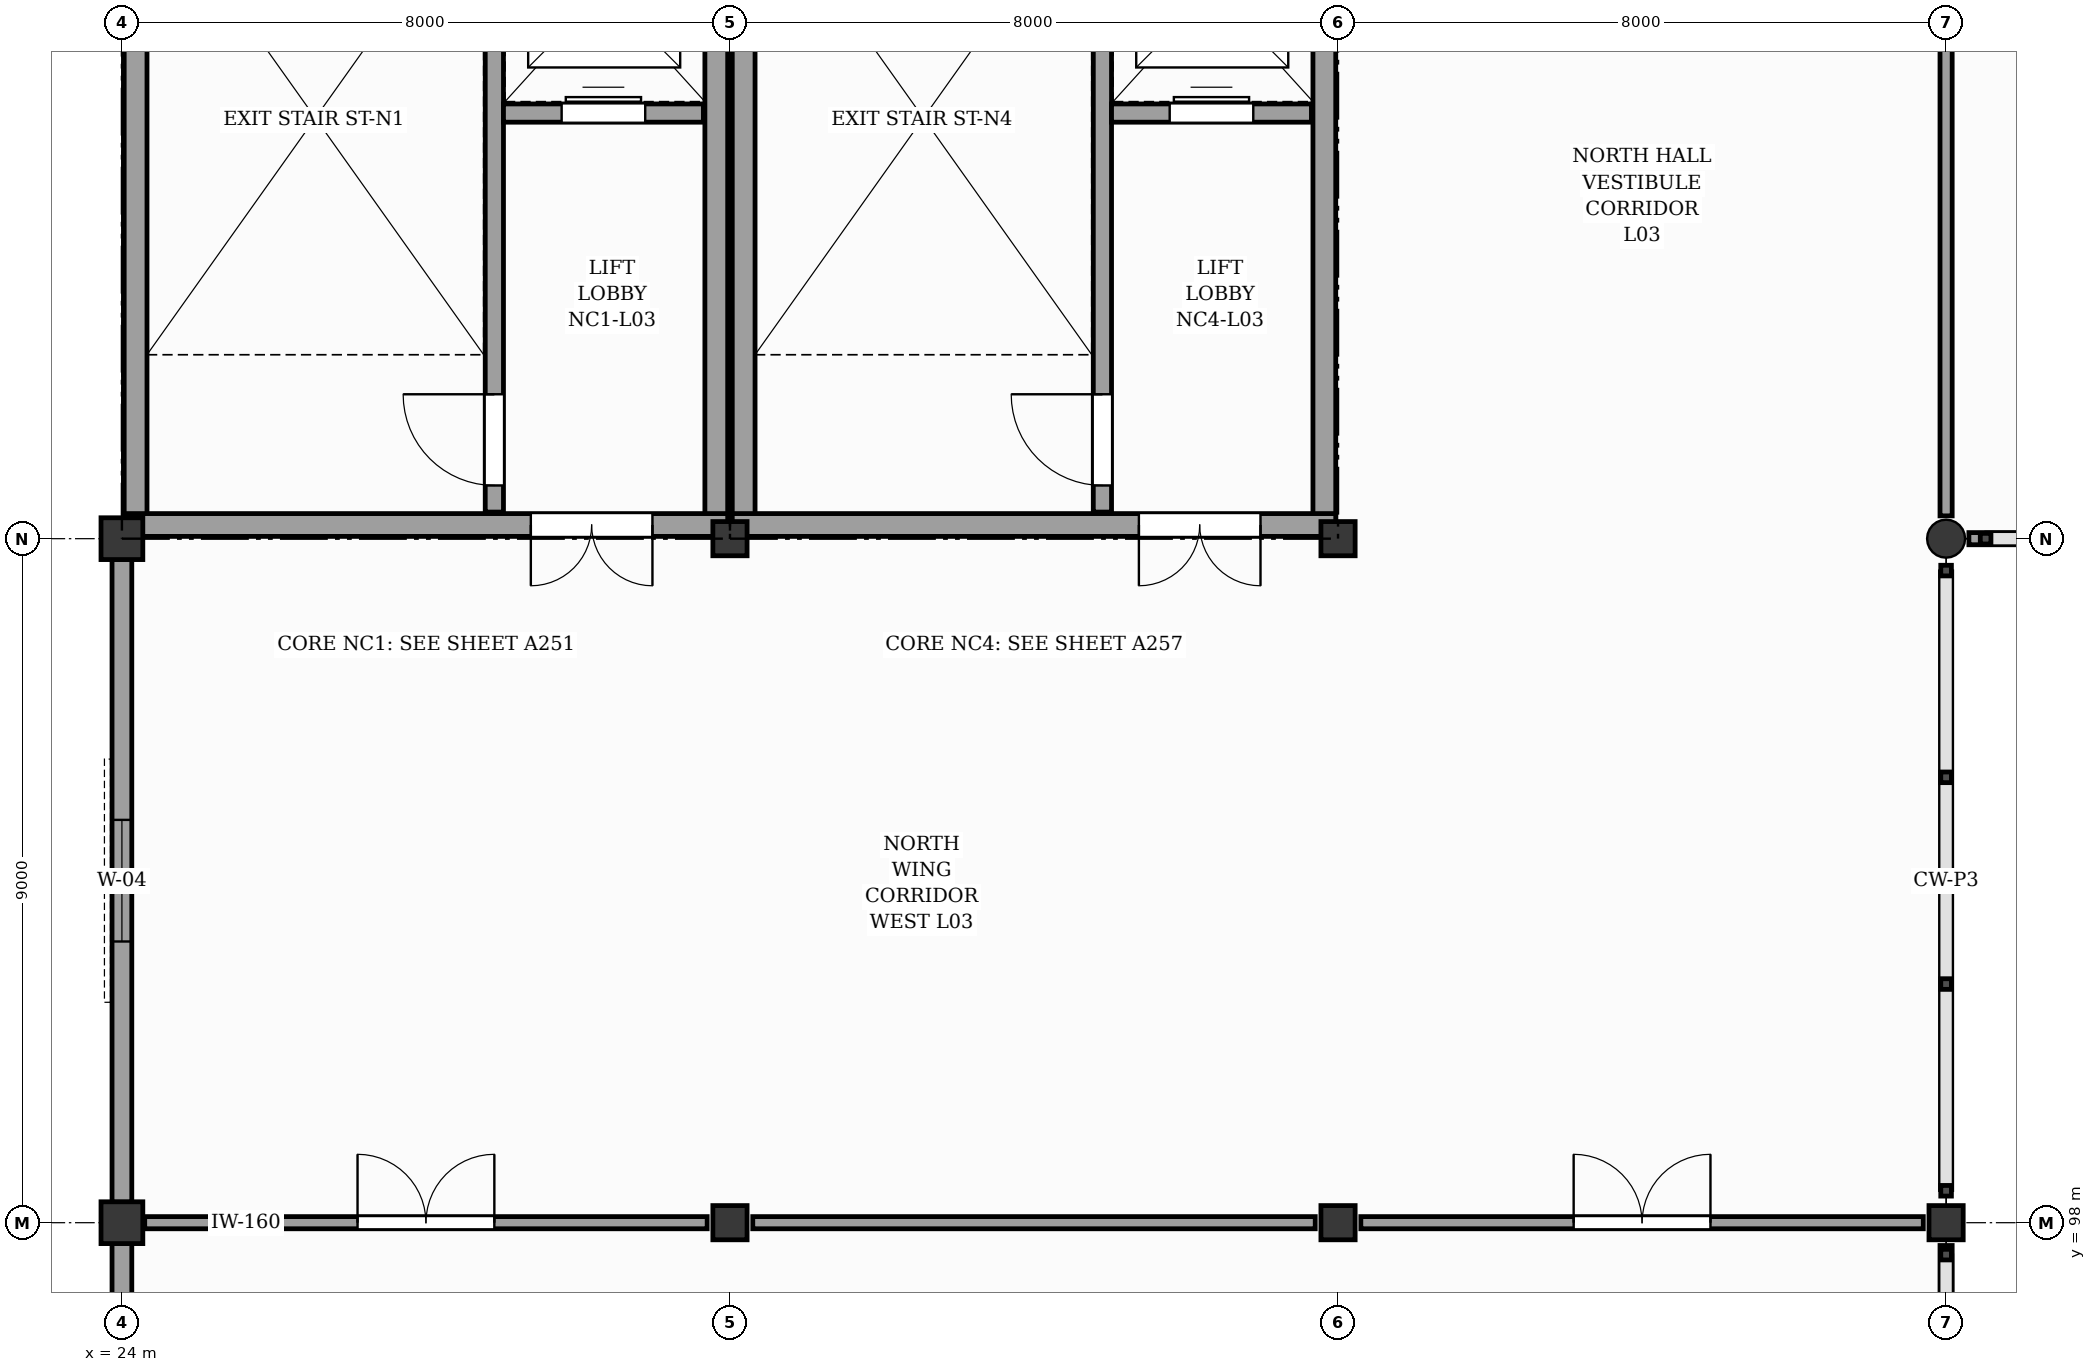
"""IFC4 building model, lengths in metres.
Left out: names, types, materials, properties, quantities, classifications, styles, units other than length and angle.
Written with IfcOpenShell. Run it as: python <this file> out.ifc"""

import sys

from ifc_helpers import new_model, si_unit, direction, frame, frame_2d, origin, origin_2d, place, context, subcontext, project, spatial, rectangle, circle, extrude, element, fill, save


model = new_model("IFC4")
c1 = context("Model", 3, precision=1e-05, world=origin(), true_north=direction((0.0, 1.0)))
c2 = subcontext(c1, "Body", "Model", "MODEL_VIEW")
j1 = project(units=[si_unit("LENGTHUNIT", "METRE"), si_unit("PLANEANGLEUNIT", "RADIAN")], contexts=[c1])
p1 = place(None, origin())
s1 = spatial("IfcSite", under=j1, at=p1, CompositionType="ELEMENT")
p2 = place(p1, origin())
s2 = spatial("IfcBuilding", under=s1, at=p2, CompositionType="ELEMENT")
p3 = place(p2, frame((0.0, 0.0, 16.2)))
s3 = spatial("IfcBuildingStorey", under=s2, at=p3, CompositionType="ELEMENT", Elevation=16.2)
for number, where, z_axis, x_axis in (
    (1, (24.0, 98.0, 0.0), (0.0, 0.0, 1.0), (1.0, 0.0, 0.0)),
    (2, (24.0, 107.0, 0.0), (0.0, 0.0, 1.0), (1.0, 0.0, 0.0)),
):
    element("IfcColumn", number, at=place(p3, frame(where, z_axis=z_axis, x_axis=x_axis)), inside=s3, PredefinedType="COLUMN", context=c2, shape_type="SweptSolid", body=[
        extrude(rectangle(XDim=0.55, YDim=0.55, at=origin_2d()), origin(), (0.0, 0.0, 1.0), 4.2),
    ])
for number, where, z_axis, x_axis in (
    (3, (32.0, 98.0, 0.0), (0.0, 0.0, 1.0), (1.0, 0.0, 0.0)),
    (4, (32.0, 107.0, 0.0), (0.0, 0.0, 1.0), (1.0, 0.0, 0.0)),
    (5, (40.0, 98.0, 0.0), (0.0, 0.0, 1.0), (1.0, 0.0, 0.0)),
    (6, (40.0, 107.0, 0.0), (0.0, 0.0, 1.0), (1.0, 0.0, 0.0)),
    (7, (48.0, 98.0, 0.0), (0.0, 0.0, 1.0), (1.0, 0.0, 0.0)),
):
    element("IfcColumn", number, at=place(p3, frame(where, z_axis=z_axis, x_axis=x_axis)), inside=s3, PredefinedType="COLUMN", context=c2, shape_type="SweptSolid", body=[
        extrude(rectangle(XDim=0.45, YDim=0.45, at=origin_2d()), origin(), (0.0, 0.0, 1.0), 4.2),
    ])
p4 = place(p3, frame((48.0, 107.0, 0.0), z_axis=(0.0, 0.0, 1.0), x_axis=(1.0, 0.0, 0.0)))
e8 = element("IfcColumn", 8, at=p4, inside=s3, PredefinedType="COLUMN", context=c2, shape_type="SweptSolid", body=[
    extrude(circle(Radius=0.25, at=origin_2d()), origin(), (0.0, 0.0, 1.0), 4.2),
])
p5 = place(p3, frame((24.0, 89.27, 0.0), z_axis=(0.0, 0.0, 1.0), x_axis=(0.0, 1.0, 0.0)))
e9 = element("IfcWall", 9, at=p5, inside=s3, PredefinedType="SOLIDWALL", context=c2, shape_type="SweptSolid", body=[
    extrude(rectangle(XDim=8.46, YDim=0.26, at=frame_2d((4.23, 0.0))), origin(), (0.0, 0.0, 1.0), 3.24),
])
p6 = place(p5, frame((3.43, 0.0, 0.95)))
e10 = element("IfcOpeningElement", 10, at=p6, cuts=e9, PredefinedType="OPENING", context=c2, shape_type="SweptSolid", body=[
    extrude(rectangle(XDim=1.6, YDim=2.1, at=frame_2d((0.8, 1.05))), frame((0.0, 0.14, 0.0), z_axis=(0.0, -1.0, 0.0), x_axis=(1.0, 0.0, 0.0)), (0.0, 0.0, 1.0), 0.28),
])
p7 = place(p3, frame((24.0, 98.27, 0.0), z_axis=(0.0, 0.0, 1.0), x_axis=(0.0, 1.0, 0.0)))
e11 = element("IfcWall", 11, at=p7, inside=s3, PredefinedType="SOLIDWALL", context=c2, shape_type="SweptSolid", body=[
    extrude(rectangle(XDim=8.46, YDim=0.26, at=frame_2d((4.23, 0.0))), origin(), (0.0, 0.0, 1.0), 3.24),
])
p8 = place(p7, frame((3.43, 0.0, 0.95)))
e12 = element("IfcOpeningElement", 12, at=p8, cuts=e11, PredefinedType="OPENING", context=c2, shape_type="SweptSolid", body=[
    extrude(rectangle(XDim=1.6, YDim=2.1, at=frame_2d((0.8, 1.05))), frame((0.0, 0.14, 0.0), z_axis=(0.0, -1.0, 0.0), x_axis=(1.0, 0.0, 0.0)), (0.0, 0.0, 1.0), 0.28),
])
p9 = place(p3, frame((28.9, 107.35, 0.0), z_axis=(0.0, 0.0, 1.0), x_axis=(0.0, 1.0, 0.0)))
e13 = element("IfcWall", 13, at=p9, inside=s3, PredefinedType="SHEAR", context=c2, shape_type="SweptSolid", body=[
    extrude(rectangle(XDim=8.3, YDim=0.24, at=frame_2d((4.15, 0.0))), origin(), (0.0, 0.0, 1.0), 3.98),
])
p10 = place(p9, frame((0.35, 0.0, 0.0)))
e14 = element("IfcOpeningElement", 14, at=p10, cuts=e13, PredefinedType="OPENING", context=c2, shape_type="SweptSolid", body=[
    extrude(rectangle(XDim=1.2, YDim=2.15, at=frame_2d((0.6, 1.075))), frame((0.0, 0.13, 0.0), z_axis=(0.0, -1.0, 0.0), x_axis=(1.0, 0.0, 0.0)), (0.0, 0.0, 1.0), 0.26),
])
p11 = place(p3, frame((29.02, 112.6, 0.0), z_axis=(0.0, 0.0, 1.0), x_axis=(1.0, 0.0, 0.0)))
e15 = element("IfcWall", 15, at=p11, inside=s3, PredefinedType="SHEAR", context=c2, shape_type="SweptSolid", body=[
    extrude(rectangle(XDim=2.63, YDim=0.24, at=frame_2d((1.315, 0.0))), origin(), (0.0, 0.0, 1.0), 3.98),
])
p12 = place(p11, frame((0.765, 0.0, 0.0)))
e16 = element("IfcOpeningElement", 16, at=p12, cuts=e15, PredefinedType="OPENING", context=c2, shape_type="SweptSolid", body=[
    extrude(rectangle(XDim=1.1, YDim=2.15, at=frame_2d((0.55, 1.075))), frame((0.0, 0.13, 0.0), z_axis=(0.0, -1.0, 0.0), x_axis=(1.0, 0.0, 0.0)), (0.0, 0.0, 1.0), 0.26),
])
for number, where, z_axis, x_axis in (
    (17, (24.18, 107.18, 0.0), (0.0, 0.0, 1.0), (0.0, 1.0, 0.0)),
    (18, (31.82, 107.18, 0.0), (0.0, 0.0, 1.0), (0.0, 1.0, 0.0)),
):
    element("IfcWall", number, at=place(p3, frame(where, z_axis=z_axis, x_axis=x_axis)), inside=s3, PredefinedType="SHEAR", context=c2, shape_type="SweptSolid", body=[
        extrude(rectangle(XDim=8.64, YDim=0.3, at=frame_2d((4.32, 0.0))), origin(), (0.0, 0.0, 1.0), 3.98),
    ])
p13 = place(p3, frame((24.03, 107.18, 0.0), z_axis=(0.0, 0.0, 1.0), x_axis=(1.0, 0.0, 0.0)))
e19 = element("IfcWall", 19, at=p13, inside=s3, PredefinedType="SHEAR", context=c2, shape_type="SweptSolid", body=[
    extrude(rectangle(XDim=7.94, YDim=0.3, at=frame_2d((3.97, 0.0))), origin(), (0.0, 0.0, 1.0), 3.98),
])
p14 = place(p13, frame((5.35, 0.0, 0.0)))
e20 = element("IfcOpeningElement", 20, at=p14, cuts=e19, PredefinedType="OPENING", context=c2, shape_type="SweptSolid", body=[
    extrude(rectangle(XDim=1.6, YDim=2.15, at=frame_2d((0.8, 1.075))), frame((0.0, 0.16, 0.0), z_axis=(0.0, -1.0, 0.0), x_axis=(1.0, 0.0, 0.0)), (0.0, 0.0, 1.0), 0.32),
])
p15 = place(p3, frame((36.9, 107.35, 0.0), z_axis=(0.0, 0.0, 1.0), x_axis=(0.0, 1.0, 0.0)))
e21 = element("IfcWall", 21, at=p15, inside=s3, PredefinedType="SHEAR", context=c2, shape_type="SweptSolid", body=[
    extrude(rectangle(XDim=8.3, YDim=0.24, at=frame_2d((4.15, 0.0))), origin(), (0.0, 0.0, 1.0), 3.98),
])
p16 = place(p15, frame((0.35, 0.0, 0.0)))
e22 = element("IfcOpeningElement", 22, at=p16, cuts=e21, PredefinedType="OPENING", context=c2, shape_type="SweptSolid", body=[
    extrude(rectangle(XDim=1.2, YDim=2.15, at=frame_2d((0.6, 1.075))), frame((0.0, 0.13, 0.0), z_axis=(0.0, -1.0, 0.0), x_axis=(1.0, 0.0, 0.0)), (0.0, 0.0, 1.0), 0.26),
])
p17 = place(p3, frame((37.02, 112.6, 0.0), z_axis=(0.0, 0.0, 1.0), x_axis=(1.0, 0.0, 0.0)))
e23 = element("IfcWall", 23, at=p17, inside=s3, PredefinedType="SHEAR", context=c2, shape_type="SweptSolid", body=[
    extrude(rectangle(XDim=2.63, YDim=0.24, at=frame_2d((1.315, 0.0))), origin(), (0.0, 0.0, 1.0), 3.98),
])
p18 = place(p17, frame((0.765, 0.0, 0.0)))
e24 = element("IfcOpeningElement", 24, at=p18, cuts=e23, PredefinedType="OPENING", context=c2, shape_type="SweptSolid", body=[
    extrude(rectangle(XDim=1.1, YDim=2.15, at=frame_2d((0.55, 1.075))), frame((0.0, 0.13, 0.0), z_axis=(0.0, -1.0, 0.0), x_axis=(1.0, 0.0, 0.0)), (0.0, 0.0, 1.0), 0.26),
])
for number, where, z_axis, x_axis in (
    (25, (32.18, 107.18, 0.0), (0.0, 0.0, 1.0), (0.0, 1.0, 0.0)),
    (26, (39.82, 107.18, 0.0), (0.0, 0.0, 1.0), (0.0, 1.0, 0.0)),
):
    element("IfcWall", number, at=place(p3, frame(where, z_axis=z_axis, x_axis=x_axis)), inside=s3, PredefinedType="SHEAR", context=c2, shape_type="SweptSolid", body=[
        extrude(rectangle(XDim=8.64, YDim=0.3, at=frame_2d((4.32, 0.0))), origin(), (0.0, 0.0, 1.0), 3.98),
    ])
p19 = place(p3, frame((32.03, 107.18, 0.0), z_axis=(0.0, 0.0, 1.0), x_axis=(1.0, 0.0, 0.0)))
e27 = element("IfcWall", 27, at=p19, inside=s3, PredefinedType="SHEAR", context=c2, shape_type="SweptSolid", body=[
    extrude(rectangle(XDim=7.94, YDim=0.3, at=frame_2d((3.97, 0.0))), origin(), (0.0, 0.0, 1.0), 3.98),
])
p20 = place(p19, frame((5.35, 0.0, 0.0)))
e28 = element("IfcOpeningElement", 28, at=p20, cuts=e27, PredefinedType="OPENING", context=c2, shape_type="SweptSolid", body=[
    extrude(rectangle(XDim=1.6, YDim=2.15, at=frame_2d((0.8, 1.075))), frame((0.0, 0.16, 0.0), z_axis=(0.0, -1.0, 0.0), x_axis=(1.0, 0.0, 0.0)), (0.0, 0.0, 1.0), 0.32),
])
p21 = place(p3, frame((24.3, 98.0, 0.0), z_axis=(0.0, 0.0, 1.0), x_axis=(1.0, 0.0, 0.0)))
e29 = element("IfcWall", 29, at=p21, inside=s3, PredefinedType="PARTITIONING", context=c2, shape_type="SweptSolid", body=[
    extrude(rectangle(XDim=7.4, YDim=0.16, at=frame_2d((3.7, 0.0))), origin(), (0.0, 0.0, 1.0), 3.1),
])
p22 = place(p21, frame((2.8, 0.0, 0.0)))
e30 = element("IfcOpeningElement", 30, at=p22, cuts=e29, PredefinedType="OPENING", context=c2, shape_type="SweptSolid", body=[
    extrude(rectangle(XDim=1.8, YDim=2.25, at=frame_2d((0.9, 1.125))), frame((0.0, 0.09, 0.0), z_axis=(0.0, -1.0, 0.0), x_axis=(1.0, 0.0, 0.0)), (0.0, 0.0, 1.0), 0.18),
])
p23 = place(p3, frame((32.3, 98.0, 0.0), z_axis=(0.0, 0.0, 1.0), x_axis=(1.0, 0.0, 0.0)))
e31 = element("IfcWall", 31, at=p23, inside=s3, PredefinedType="PARTITIONING", context=c2, shape_type="SweptSolid", body=[
    extrude(rectangle(XDim=7.4, YDim=0.16, at=frame_2d((3.7, 0.0))), origin(), (0.0, 0.0, 1.0), 3.1),
])
p24 = place(p3, frame((40.3, 98.0, 0.0), z_axis=(0.0, 0.0, 1.0), x_axis=(1.0, 0.0, 0.0)))
e32 = element("IfcWall", 32, at=p24, inside=s3, PredefinedType="PARTITIONING", context=c2, shape_type="SweptSolid", body=[
    extrude(rectangle(XDim=7.4, YDim=0.16, at=frame_2d((3.7, 0.0))), origin(), (0.0, 0.0, 1.0), 3.1),
])
p25 = place(p24, frame((2.8, 0.0, 0.0)))
e33 = element("IfcOpeningElement", 33, at=p25, cuts=e32, PredefinedType="OPENING", context=c2, shape_type="SweptSolid", body=[
    extrude(rectangle(XDim=1.8, YDim=2.25, at=frame_2d((0.9, 1.125))), frame((0.0, 0.09, 0.0), z_axis=(0.0, -1.0, 0.0), x_axis=(1.0, 0.0, 0.0)), (0.0, 0.0, 1.0), 0.18),
])
p26 = place(p3, frame((48.0, 89.3, 0.0), z_axis=(0.0, 0.0, 1.0), x_axis=(0.0, 1.0, 0.0)))
e34 = element("IfcWall", 34, at=p26, inside=s3, PredefinedType="PARTITIONING", context=c2, shape_type="SweptSolid", body=[
    extrude(rectangle(XDim=8.4, YDim=0.16, at=frame_2d((4.2, 0.0))), origin(), (0.0, 0.0, 1.0), 3.1),
])
p27 = place(p3, frame((48.3, 107.0, 0.0), z_axis=(0.0, 0.0, 1.0), x_axis=(1.0, 0.0, 0.0)))
e35 = element("IfcWall", 35, at=p27, inside=s3, PredefinedType="PARTITIONING", context=c2, shape_type="SweptSolid", body=[
    extrude(rectangle(XDim=7.4, YDim=0.16, at=frame_2d((3.7, 0.0))), origin(), (0.0, 0.0, 1.0), 3.1),
])
p28 = place(p3, frame((48.0, 107.3, 0.0), z_axis=(0.0, 0.0, 1.0), x_axis=(0.0, 1.0, 0.0)))
e36 = element("IfcWall", 36, at=p28, inside=s3, PredefinedType="PARTITIONING", context=c2, shape_type="SweptSolid", body=[
    extrude(rectangle(XDim=8.4, YDim=0.16, at=frame_2d((4.2, 0.0))), origin(), (0.0, 0.0, 1.0), 3.1),
])
p29 = place(p8, origin())
e37 = element("IfcWindow", 37, at=p29, inside=s3, PartitioningType="SINGLE_PANEL", PredefinedType="WINDOW", context=c2, shape_type="SweptSolid", body=[
    extrude(rectangle(XDim=1.6, YDim=2.1, at=frame_2d((0.8, 1.05))), frame((0.0, 0.03, 0.0), z_axis=(0.0, -1.0, 0.0), x_axis=(1.0, 0.0, 0.0)), (0.0, 0.0, 1.0), 0.06),
])
fill(e12, e37)
p30 = place(p10, origin())
e38 = element("IfcDoor", 38, at=p30, inside=s3, OperationType="SINGLE_SWING_RIGHT", PredefinedType="DOOR", context=c2, shape_type="SweptSolid", body=[
    extrude(rectangle(XDim=1.2, YDim=2.15, at=frame_2d((0.6, 1.075))), frame((0.0, 0.025, 0.0), z_axis=(0.0, -1.0, 0.0), x_axis=(1.0, 0.0, 0.0)), (0.0, 0.0, 1.0), 0.05),
])
fill(e14, e38)
p31 = place(p12, origin())
e39 = element("IfcDoor", 39, at=p31, inside=s3, OperationType="DOUBLE_DOOR_SLIDING", PredefinedType="DOOR", context=c2, shape_type="SweptSolid", body=[
    extrude(rectangle(XDim=1.1, YDim=2.15, at=frame_2d((0.55, 1.075))), frame((0.0, 0.025, 0.0), z_axis=(0.0, -1.0, 0.0), x_axis=(1.0, 0.0, 0.0)), (0.0, 0.0, 1.0), 0.05),
])
fill(e16, e39)
p32 = place(p14, frame((1.6, 0.0, 0.0), z_axis=(0.0, 0.0, 1.0), x_axis=(-1.0, 0.0, 0.0)))
e40 = element("IfcDoor", 40, at=p32, inside=s3, OperationType="DOUBLE_DOOR_SINGLE_SWING", PredefinedType="DOOR", context=c2, shape_type="SweptSolid", body=[
    extrude(rectangle(XDim=1.6, YDim=2.15, at=frame_2d((0.8, 1.075))), frame((0.0, 0.025, 0.0), z_axis=(0.0, -1.0, 0.0), x_axis=(1.0, 0.0, 0.0)), (0.0, 0.0, 1.0), 0.05),
])
fill(e20, e40)
p33 = place(p16, origin())
e41 = element("IfcDoor", 41, at=p33, inside=s3, OperationType="SINGLE_SWING_RIGHT", PredefinedType="DOOR", context=c2, shape_type="SweptSolid", body=[
    extrude(rectangle(XDim=1.2, YDim=2.15, at=frame_2d((0.6, 1.075))), frame((0.0, 0.025, 0.0), z_axis=(0.0, -1.0, 0.0), x_axis=(1.0, 0.0, 0.0)), (0.0, 0.0, 1.0), 0.05),
])
fill(e22, e41)
p34 = place(p18, origin())
e42 = element("IfcDoor", 42, at=p34, inside=s3, OperationType="DOUBLE_DOOR_SLIDING", PredefinedType="DOOR", context=c2, shape_type="SweptSolid", body=[
    extrude(rectangle(XDim=1.1, YDim=2.15, at=frame_2d((0.55, 1.075))), frame((0.0, 0.025, 0.0), z_axis=(0.0, -1.0, 0.0), x_axis=(1.0, 0.0, 0.0)), (0.0, 0.0, 1.0), 0.05),
])
fill(e24, e42)
p35 = place(p20, frame((1.6, 0.0, 0.0), z_axis=(0.0, 0.0, 1.0), x_axis=(-1.0, 0.0, 0.0)))
e43 = element("IfcDoor", 43, at=p35, inside=s3, OperationType="DOUBLE_DOOR_SINGLE_SWING", PredefinedType="DOOR", context=c2, shape_type="SweptSolid", body=[
    extrude(rectangle(XDim=1.6, YDim=2.15, at=frame_2d((0.8, 1.075))), frame((0.0, 0.025, 0.0), z_axis=(0.0, -1.0, 0.0), x_axis=(1.0, 0.0, 0.0)), (0.0, 0.0, 1.0), 0.05),
])
fill(e28, e43)
p36 = place(p22, origin())
e44 = element("IfcDoor", 44, at=p36, inside=s3, OperationType="DOUBLE_DOOR_SINGLE_SWING", PredefinedType="DOOR", context=c2, shape_type="SweptSolid", body=[
    extrude(rectangle(XDim=1.8, YDim=2.25, at=frame_2d((0.9, 1.125))), frame((0.0, 0.025, 0.0), z_axis=(0.0, -1.0, 0.0), x_axis=(1.0, 0.0, 0.0)), (0.0, 0.0, 1.0), 0.05),
])
fill(e30, e44)
p37 = place(p25, origin())
e45 = element("IfcDoor", 45, at=p37, inside=s3, OperationType="DOUBLE_DOOR_SINGLE_SWING", PredefinedType="DOOR", context=c2, shape_type="SweptSolid", body=[
    extrude(rectangle(XDim=1.8, YDim=2.25, at=frame_2d((0.9, 1.125))), frame((0.0, 0.025, 0.0), z_axis=(0.0, -1.0, 0.0), x_axis=(1.0, 0.0, 0.0)), (0.0, 0.0, 1.0), 0.05),
])
fill(e33, e45)
save(model, sys.argv[1])
